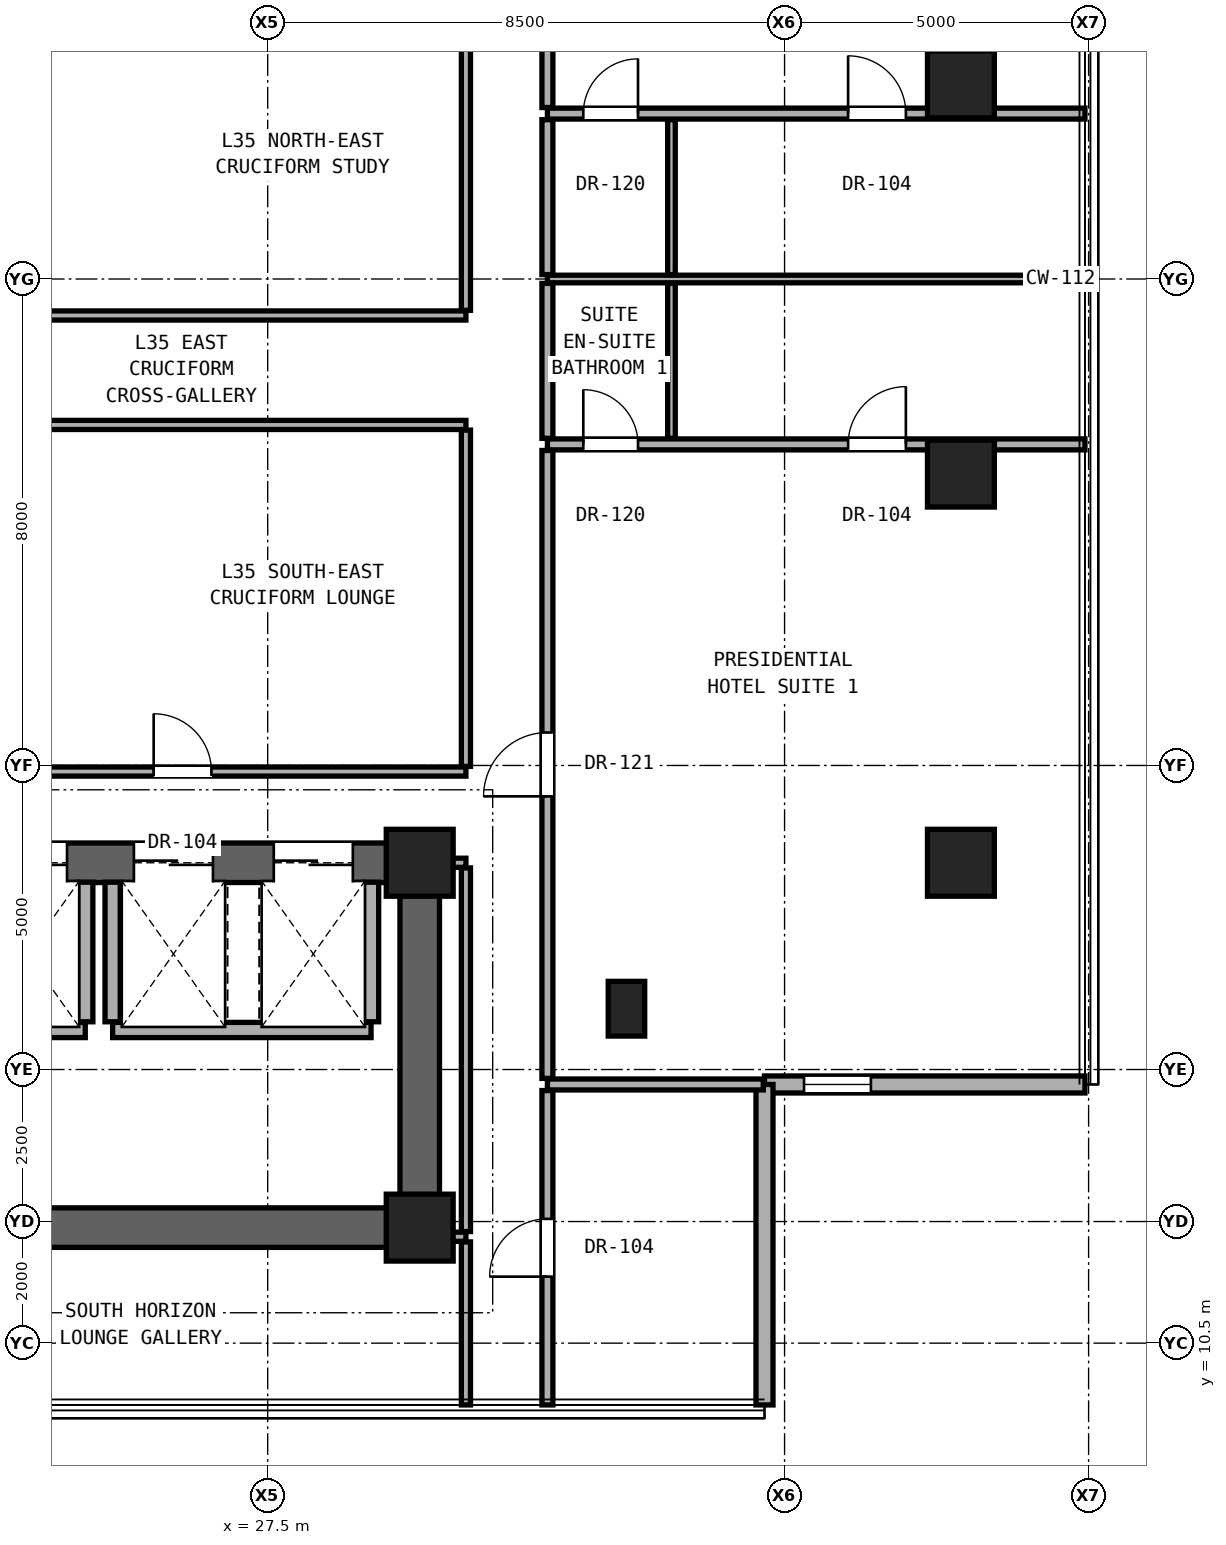
"""IFC4 building model, lengths in metres.
Left out: names, types, materials, properties, quantities, classifications, styles, units other than length and angle.
Written with IfcOpenShell. Run it as: python <this file> out.ifc"""

import sys

from ifc_helpers import new_model, si_unit, direction, frame, frame_2d, origin, origin_2d, place, context, subcontext, project, spatial, rectangle, hollow_rectangle, extrude, element, fill, save


model = new_model("IFC4")
c1 = context("Model", 3, precision=1e-05, world=origin(), true_north=direction((0.0, 1.0)))
c2 = subcontext(c1, "Body", "Model", "MODEL_VIEW")
j1 = project(units=[si_unit("LENGTHUNIT", "METRE"), si_unit("PLANEANGLEUNIT", "RADIAN")], contexts=[c1])
p1 = place(None, origin())
s1 = spatial("IfcSite", under=j1, at=p1, CompositionType="ELEMENT")
p2 = place(p1, origin())
s2 = spatial("IfcBuilding", under=s1, at=p2, CompositionType="ELEMENT")
p3 = place(p2, frame((0.0, 0.0, 124.7)))
s3 = spatial("IfcBuildingStorey", under=s2, at=p3, CompositionType="ELEMENT", Elevation=124.7)
for number, where, z_axis, x_axis in (
    (1, (30.0, 12.4, 0.0), (0.0, 0.0, 1.0), (1.0, 0.0, 0.0)),
    (2, (30.0, 18.4, 0.0), (0.0, 0.0, 1.0), (1.0, 0.0, 0.0)),
):
    element("IfcColumn", number, at=place(p3, frame(where, z_axis=z_axis, x_axis=x_axis)), inside=s3, PredefinedType="COLUMN", context=c2, shape_type="SweptSolid", body=[
        extrude(rectangle(XDim=1.1, YDim=1.1, at=origin_2d()), origin(), (0.0, 0.0, 1.0), 3.3),
    ])
for number, where, z_axis, x_axis in (
    (3, (38.9, 18.4, 0.0), (0.0, 0.0, 1.0), (1.0, 0.0, 0.0)),
    (4, (38.9, 24.8, 0.0), (0.0, 0.0, 1.0), (1.0, 0.0, 0.0)),
    (5, (38.9, 31.2, 0.0), (0.0, 0.0, 1.0), (1.0, 0.0, 0.0)),
):
    element("IfcColumn", number, at=place(p3, frame(where, z_axis=z_axis, x_axis=x_axis)), inside=s3, PredefinedType="COLUMN", context=c2, shape_type="SweptSolid", body=[
        extrude(hollow_rectangle(XDim=1.1, YDim=1.1, WallThickness=0.06, at=origin_2d()), origin(), (0.0, 0.0, 1.0), 3.3),
    ])
p4 = place(p3, frame((33.4, 16.0, 0.0), z_axis=(0.0, 0.0, 1.0), x_axis=(1.0, 0.0, 0.0)))
e6 = element("IfcColumn", 6, at=p4, inside=s3, PredefinedType="PILASTER", context=c2, shape_type="SweptSolid", body=[
    extrude(rectangle(XDim=0.6, YDim=0.9, at=origin_2d()), origin(), (0.0, 0.0, 1.0), 3.3),
])
p5 = place(p3, frame((11.0, 12.4, 0.0), z_axis=(0.0, 0.0, 1.0), x_axis=(1.0, 0.0, 0.0)))
e7 = element("IfcWall", 7, at=p5, inside=s3, PredefinedType="SHEAR", context=c2, shape_type="SweptSolid", body=[
    extrude(rectangle(XDim=19.0, YDim=0.65, at=frame_2d((9.5, 0.0))), origin(), (0.0, 0.0, 1.0), 3.08),
])
p6 = place(p3, frame((30.0, 12.4, 0.0), z_axis=(0.0, 0.0, 1.0), x_axis=(0.0, 1.0, 0.0)))
e8 = element("IfcWall", 8, at=p6, inside=s3, PredefinedType="SHEAR", context=c2, shape_type="SweptSolid", body=[
    extrude(rectangle(XDim=6.0, YDim=0.65, at=frame_2d((3.0, 0.0))), origin(), (0.0, 0.0, 1.0), 3.08),
])
p7 = place(p3, frame((11.0, 18.4, 0.0), z_axis=(0.0, 0.0, 1.0), x_axis=(1.0, 0.0, 0.0)))
e9 = element("IfcWall", 9, at=p7, inside=s3, PredefinedType="SHEAR", context=c2, shape_type="SweptSolid", body=[
    extrude(rectangle(XDim=19.0, YDim=0.65, at=frame_2d((9.5, 0.0))), origin(), (0.0, 0.0, 1.0), 3.08),
])
p8 = place(p7, frame((4.175, 0.0, 0.0)))
e10 = element("IfcOpeningElement", 10, at=p8, cuts=e9, PredefinedType="OPENING", context=c2, shape_type="SweptSolid", body=[
    extrude(rectangle(XDim=1.2, YDim=2.25, at=frame_2d((0.6, 1.125))), frame((0.0, 0.335, 0.0), z_axis=(0.0, -1.0, 0.0), x_axis=(1.0, 0.0, 0.0)), (0.0, 0.0, 1.0), 0.67),
])
p9 = place(p7, frame((9.6, 0.0, 0.0)))
e11 = element("IfcOpeningElement", 11, at=p9, cuts=e9, PredefinedType="OPENING", context=c2, shape_type="SweptSolid", body=[
    extrude(rectangle(XDim=1.3, YDim=2.3, at=frame_2d((0.65, 1.15))), frame((0.0, 0.335, 0.0), z_axis=(0.0, -1.0, 0.0), x_axis=(1.0, 0.0, 0.0)), (0.0, 0.0, 1.0), 0.67),
])
p10 = place(p7, frame((11.9, 0.0, 0.0)))
e12 = element("IfcOpeningElement", 12, at=p10, cuts=e9, PredefinedType="OPENING", context=c2, shape_type="SweptSolid", body=[
    extrude(rectangle(XDim=1.3, YDim=2.3, at=frame_2d((0.65, 1.15))), frame((0.0, 0.335, 0.0), z_axis=(0.0, -1.0, 0.0), x_axis=(1.0, 0.0, 0.0)), (0.0, 0.0, 1.0), 0.67),
])
p11 = place(p7, frame((14.3, 0.0, 0.0)))
e13 = element("IfcOpeningElement", 13, at=p11, cuts=e9, PredefinedType="OPENING", context=c2, shape_type="SweptSolid", body=[
    extrude(rectangle(XDim=1.3, YDim=2.3, at=frame_2d((0.65, 1.15))), frame((0.0, 0.335, 0.0), z_axis=(0.0, -1.0, 0.0), x_axis=(1.0, 0.0, 0.0)), (0.0, 0.0, 1.0), 0.67),
])
p12 = place(p7, frame((16.6, 0.0, 0.0)))
e14 = element("IfcOpeningElement", 14, at=p12, cuts=e9, PredefinedType="OPENING", context=c2, shape_type="SweptSolid", body=[
    extrude(rectangle(XDim=1.3, YDim=2.3, at=frame_2d((0.65, 1.15))), frame((0.0, 0.335, 0.0), z_axis=(0.0, -1.0, 0.0), x_axis=(1.0, 0.0, 0.0)), (0.0, 0.0, 1.0), 0.67),
])
p13 = place(p3, frame((35.67, 14.754, 0.0), z_axis=(0.0, 0.0, 1.0), x_axis=(1.0, 0.0, 0.0)))
e15 = element("IfcWall", 15, at=p13, inside=s3, PredefinedType="SOLIDWALL", context=c2, shape_type="SweptSolid", body=[
    extrude(rectangle(XDim=5.27, YDim=0.28, at=frame_2d((2.635, 0.0))), origin(), (0.0, 0.0, 1.0), 3.06),
])
p14 = place(p13, frame((0.65, 0.0, 0.85)))
e16 = element("IfcOpeningElement", 16, at=p14, cuts=e15, PredefinedType="OPENING", context=c2, shape_type="SweptSolid", body=[
    extrude(rectangle(XDim=1.1, YDim=2.0, at=frame_2d((0.55, 1.0))), frame((0.0, 0.15, 0.0), z_axis=(0.0, -1.0, 0.0), x_axis=(1.0, 0.0, 0.0)), (0.0, 0.0, 1.0), 0.3),
])
p15 = place(p3, frame((35.67, 9.484, 0.0), z_axis=(0.0, 0.0, 1.0), x_axis=(0.0, 1.0, 0.0)))
e17 = element("IfcWall", 17, at=p15, inside=s3, PredefinedType="SOLIDWALL", context=c2, shape_type="SweptSolid", body=[
    extrude(rectangle(XDim=5.27, YDim=0.28, at=frame_2d((2.635, 0.0))), origin(), (0.0, 0.0, 1.0), 3.06),
])
p16 = place(p3, frame((30.32, 12.25, 0.0), z_axis=(0.0, 0.0, 1.0), x_axis=(1.0, 0.0, 0.0)))
e18 = element("IfcWall", 18, at=p16, inside=s3, PredefinedType="PARTITIONING", context=c2, shape_type="SweptSolid", body=[
    extrude(rectangle(XDim=0.44, YDim=0.15, at=frame_2d((0.22, 0.0))), origin(), (0.0, 0.0, 1.0), 3.08),
])
p17 = place(p3, frame((32.1, 14.754, 0.0), z_axis=(0.0, 0.0, 1.0), x_axis=(1.0, 0.0, 0.0)))
e19 = element("IfcWall", 19, at=p17, inside=s3, PredefinedType="PARTITIONING", context=c2, shape_type="SweptSolid", body=[
    extrude(rectangle(XDim=3.55, YDim=0.18, at=frame_2d((1.775, 0.0))), origin(), (0.0, 0.0, 1.0), 3.08),
])
p18 = place(p3, frame((20.35, 15.65, 0.0), z_axis=(0.0, 0.0, 1.0), x_axis=(1.0, 0.0, 0.0)))
e20 = element("IfcWall", 20, at=p18, inside=s3, PredefinedType="SOLIDWALL", context=c2, shape_type="SweptSolid", body=[
    extrude(rectangle(XDim=4.15, YDim=0.25, at=frame_2d((2.075, 0.0))), origin(), (0.0, 0.0, 1.0), 3.08),
])
p19 = place(p3, frame((24.95, 15.65, 0.0), z_axis=(0.0, 0.0, 1.0), x_axis=(1.0, 0.0, 0.0)))
e21 = element("IfcWall", 21, at=p19, inside=s3, PredefinedType="SOLIDWALL", context=c2, shape_type="SweptSolid", body=[
    extrude(rectangle(XDim=4.25, YDim=0.25, at=frame_2d((2.125, 0.0))), origin(), (0.0, 0.0, 1.0), 3.08),
])
p20 = place(p3, frame((30.32, 18.4, 0.0), z_axis=(0.0, 0.0, 1.0), x_axis=(1.0, 0.0, 0.0)))
e22 = element("IfcWall", 22, at=p20, inside=s3, PredefinedType="PARTITIONING", context=c2, shape_type="SweptSolid", body=[
    extrude(rectangle(XDim=0.44, YDim=0.15, at=frame_2d((0.22, 0.0))), origin(), (0.0, 0.0, 1.0), 2.456),
])
p21 = place(p3, frame((21.44, 19.9, 0.0), z_axis=(0.0, 0.0, 1.0), x_axis=(1.0, 0.0, 0.0)))
e23 = element("IfcWall", 23, at=p21, inside=s3, PredefinedType="PARTITIONING", context=c2, shape_type="SweptSolid", body=[
    extrude(rectangle(XDim=9.32, YDim=0.15, at=frame_2d((4.66, 0.0))), origin(), (0.0, 0.0, 1.0), 2.216),
])
p22 = place(p21, frame((4.185, 0.0, 0.0)))
e24 = element("IfcOpeningElement", 24, at=p22, cuts=e23, PredefinedType="OPENING", context=c2, shape_type="SweptSolid", body=[
    extrude(rectangle(XDim=0.95, YDim=2.15, at=frame_2d((0.475, 1.075))), frame((0.0, 0.085, 0.0), z_axis=(0.0, -1.0, 0.0), x_axis=(1.0, 0.0, 0.0)), (0.0, 0.0, 1.0), 0.17),
])
p23 = place(p3, frame((32.1, 25.28, 0.0), z_axis=(0.0, 0.0, 1.0), x_axis=(1.0, 0.0, 0.0)))
e25 = element("IfcWall", 25, at=p23, inside=s3, PredefinedType="PARTITIONING", context=c2, shape_type="SweptSolid", body=[
    extrude(rectangle(XDim=8.84, YDim=0.18, at=frame_2d((4.42, 0.0))), origin(), (0.0, 0.0, 1.0), 2.299),
])
p24 = place(p23, frame((4.945, 0.0, 0.0)))
e26 = element("IfcOpeningElement", 26, at=p24, cuts=e25, PredefinedType="OPENING", context=c2, shape_type="SweptSolid", body=[
    extrude(rectangle(XDim=0.95, YDim=2.15, at=frame_2d((0.475, 1.075))), frame((0.0, 0.1, 0.0), z_axis=(0.0, -1.0, 0.0), x_axis=(1.0, 0.0, 0.0)), (0.0, 0.0, 1.0), 0.2),
])
p25 = place(p23, frame((0.59, 0.0, 0.0)))
e27 = element("IfcOpeningElement", 27, at=p25, cuts=e25, PredefinedType="OPENING", context=c2, shape_type="SweptSolid", body=[
    extrude(rectangle(XDim=0.9, YDim=2.1, at=frame_2d((0.45, 1.05))), frame((0.0, 0.1, 0.0), z_axis=(0.0, -1.0, 0.0), x_axis=(1.0, 0.0, 0.0)), (0.0, 0.0, 1.0), 0.2),
])
for number, where, z_axis, x_axis in (
    (28, (21.4, 25.6, 0.0), (0.0, 0.0, 1.0), (1.0, 0.0, 0.0)),
    (29, (21.4, 27.4, 0.0), (0.0, 0.0, 1.0), (1.0, 0.0, 0.0)),
):
    element("IfcWall", number, at=place(p3, frame(where, z_axis=z_axis, x_axis=x_axis)), inside=s3, PredefinedType="PARTITIONING", context=c2, shape_type="SweptSolid", body=[
        extrude(rectangle(XDim=9.36, YDim=0.15, at=frame_2d((4.68, 0.0))), origin(), (0.0, 0.0, 1.0), 2.216),
    ])
p26 = place(p3, frame((32.1, 28.0, 0.0), z_axis=(0.0, 0.0, 1.0), x_axis=(1.0, 0.0, 0.0)))
e30 = element("IfcWall", 30, at=p26, inside=s3, PredefinedType="PARTITIONING", context=c2, shape_type="SweptSolid", body=[
    extrude(rectangle(XDim=8.84, YDim=0.125, at=frame_2d((4.42, 0.0))), origin(), (0.0, 0.0, 1.0), 2.299),
])
p27 = place(p3, frame((32.1, 30.72, 0.0), z_axis=(0.0, 0.0, 1.0), x_axis=(1.0, 0.0, 0.0)))
e31 = element("IfcWall", 31, at=p27, inside=s3, PredefinedType="PARTITIONING", context=c2, shape_type="SweptSolid", body=[
    extrude(rectangle(XDim=8.84, YDim=0.18, at=frame_2d((4.42, 0.0))), origin(), (0.0, 0.0, 1.0), 2.299),
])
p28 = place(p27, frame((4.945, 0.0, 0.0)))
e32 = element("IfcOpeningElement", 32, at=p28, cuts=e31, PredefinedType="OPENING", context=c2, shape_type="SweptSolid", body=[
    extrude(rectangle(XDim=0.95, YDim=2.15, at=frame_2d((0.475, 1.075))), frame((0.0, 0.1, 0.0), z_axis=(0.0, -1.0, 0.0), x_axis=(1.0, 0.0, 0.0)), (0.0, 0.0, 1.0), 0.2),
])
p29 = place(p27, frame((0.59, 0.0, 0.0)))
e33 = element("IfcOpeningElement", 33, at=p29, cuts=e31, PredefinedType="OPENING", context=c2, shape_type="SweptSolid", body=[
    extrude(rectangle(XDim=0.9, YDim=2.1, at=frame_2d((0.45, 1.05))), frame((0.0, 0.1, 0.0), z_axis=(0.0, -1.0, 0.0), x_axis=(1.0, 0.0, 0.0)), (0.0, 0.0, 1.0), 0.2),
])
for number, where, z_axis, x_axis in (
    (34, (24.5, 15.785, 0.0), (0.0, 0.0, 1.0), (0.0, 1.0, 0.0)),
    (35, (24.95, 15.785, 0.0), (0.0, 0.0, 1.0), (0.0, 1.0, 0.0)),
    (36, (29.2, 15.785, 0.0), (0.0, 0.0, 1.0), (0.0, 1.0, 0.0)),
):
    element("IfcWall", number, at=place(p3, frame(where, z_axis=z_axis, x_axis=x_axis)), inside=s3, PredefinedType="SOLIDWALL", context=c2, shape_type="SweptSolid", body=[
        extrude(rectangle(XDim=2.295, YDim=0.25, at=frame_2d((1.147, 0.0))), origin(), (0.0, 0.0, 1.0), 3.08),
    ])
p30 = place(p3, frame((30.76, 9.484, 0.0), z_axis=(0.0, 0.0, 1.0), x_axis=(0.0, 1.0, 0.0)))
e37 = element("IfcWall", 37, at=p30, inside=s3, PredefinedType="PARTITIONING", context=c2, shape_type="SweptSolid", body=[
    extrude(rectangle(XDim=2.681, YDim=0.15, at=frame_2d((1.341, 0.0))), origin(), (0.0, 0.0, 1.0), 3.08),
])
p31 = place(p3, frame((30.76, 12.335, 0.0), z_axis=(0.0, 0.0, 1.0), x_axis=(0.0, 1.0, 0.0)))
e38 = element("IfcWall", 38, at=p31, inside=s3, PredefinedType="PARTITIONING", context=c2, shape_type="SweptSolid", body=[
    extrude(rectangle(XDim=5.98, YDim=0.15, at=frame_2d((2.99, 0.0))), origin(), (0.0, 0.0, 1.0), 2.456),
])
for number, where, z_axis, x_axis in (
    (39, (30.76, 19.985, 0.0), (0.0, 0.0, 1.0), (0.0, 1.0, 0.0)),
    (40, (30.76, 27.485, 0.0), (0.0, 0.0, 1.0), (0.0, 1.0, 0.0)),
):
    element("IfcWall", number, at=place(p3, frame(where, z_axis=z_axis, x_axis=x_axis)), inside=s3, PredefinedType="PARTITIONING", context=c2, shape_type="SweptSolid", body=[
        extrude(rectangle(XDim=5.53, YDim=0.15, at=frame_2d((2.765, 0.0))), origin(), (0.0, 0.0, 1.0), 2.299),
    ])
p32 = place(p3, frame((32.1, 9.484, 0.0), z_axis=(0.0, 0.0, 1.0), x_axis=(0.0, 1.0, 0.0)))
e41 = element("IfcWall", 41, at=p32, inside=s3, PredefinedType="PARTITIONING", context=c2, shape_type="SweptSolid", body=[
    extrude(rectangle(XDim=5.17, YDim=0.18, at=frame_2d((2.585, 0.0))), origin(), (0.0, 0.0, 1.0), 3.08),
])
p33 = place(p32, frame((2.11, 0.0, 0.0)))
e42 = element("IfcOpeningElement", 42, at=p33, cuts=e41, PredefinedType="OPENING", context=c2, shape_type="SweptSolid", body=[
    extrude(rectangle(XDim=0.95, YDim=2.15, at=frame_2d((0.475, 1.075))), frame((0.0, 0.1, 0.0), z_axis=(0.0, -1.0, 0.0), x_axis=(1.0, 0.0, 0.0)), (0.0, 0.0, 1.0), 0.2),
])
p34 = place(p3, frame((32.1, 14.854, 0.0), z_axis=(0.0, 0.0, 1.0), x_axis=(0.0, 1.0, 0.0)))
e43 = element("IfcWall", 43, at=p34, inside=s3, PredefinedType="PARTITIONING", context=c2, shape_type="SweptSolid", body=[
    extrude(rectangle(XDim=10.326, YDim=0.18, at=frame_2d((5.163, 0.0))), origin(), (0.0, 0.0, 1.0), 2.299),
])
p35 = place(p34, frame((4.638, 0.0, 0.0)))
e44 = element("IfcOpeningElement", 44, at=p35, cuts=e43, PredefinedType="OPENING", context=c2, shape_type="SweptSolid", body=[
    extrude(rectangle(XDim=1.05, YDim=2.2, at=frame_2d((0.525, 1.1))), frame((0.0, 0.1, 0.0), z_axis=(0.0, -1.0, 0.0), x_axis=(1.0, 0.0, 0.0)), (0.0, 0.0, 1.0), 0.2),
])
for number, where, z_axis, x_axis in (
    (45, (32.1, 25.38, 0.0), (0.0, 0.0, 1.0), (0.0, 1.0, 0.0)),
    (46, (32.1, 28.073, 0.0), (0.0, 0.0, 1.0), (0.0, 1.0, 0.0)),
):
    element("IfcWall", number, at=place(p3, frame(where, z_axis=z_axis, x_axis=x_axis)), inside=s3, PredefinedType="PARTITIONING", context=c2, shape_type="SweptSolid", body=[
        extrude(rectangle(XDim=2.548, YDim=0.18, at=frame_2d((1.274, 0.0))), origin(), (0.0, 0.0, 1.0), 3.08),
    ])
p36 = place(p3, frame((32.1, 30.82, 0.0), z_axis=(0.0, 0.0, 1.0), x_axis=(0.0, 1.0, 0.0)))
e47 = element("IfcWall", 47, at=p36, inside=s3, PredefinedType="PARTITIONING", context=c2, shape_type="SweptSolid", body=[
    extrude(rectangle(XDim=10.326, YDim=0.18, at=frame_2d((5.163, 0.0))), origin(), (0.0, 0.0, 1.0), 2.299),
])
p37 = place(p36, frame((4.638, 0.0, 0.0)))
e48 = element("IfcOpeningElement", 48, at=p37, cuts=e47, PredefinedType="OPENING", context=c2, shape_type="SweptSolid", body=[
    extrude(rectangle(XDim=1.05, YDim=2.2, at=frame_2d((0.525, 1.1))), frame((0.0, 0.1, 0.0), z_axis=(0.0, -1.0, 0.0), x_axis=(1.0, 0.0, 0.0)), (0.0, 0.0, 1.0), 0.2),
])
for number, where, z_axis, x_axis in (
    (49, (34.14, 25.38, 0.0), (0.0, 0.0, 1.0), (0.0, 1.0, 0.0)),
    (50, (34.14, 28.073, 0.0), (0.0, 0.0, 1.0), (0.0, 1.0, 0.0)),
):
    element("IfcWall", number, at=place(p3, frame(where, z_axis=z_axis, x_axis=x_axis)), inside=s3, PredefinedType="PARTITIONING", context=c2, shape_type="SweptSolid", body=[
        extrude(rectangle(XDim=2.548, YDim=0.125, at=frame_2d((1.274, 0.0))), origin(), (0.0, 0.0, 1.0), 3.08),
    ])
p38 = place(p14, origin())
e51 = element("IfcWindow", 51, at=p38, inside=s3, PartitioningType="SINGLE_PANEL", PredefinedType="WINDOW", context=c2, shape_type="SweptSolid", body=[
    extrude(rectangle(XDim=1.1, YDim=2.0, at=frame_2d((0.55, 1.0))), frame((0.0, 0.03, 0.0), z_axis=(0.0, -1.0, 0.0), x_axis=(1.0, 0.0, 0.0)), (0.0, 0.0, 1.0), 0.06),
])
fill(e16, e51)
p39 = place(p35, origin())
e52 = element("IfcDoor", 52, at=p39, inside=s3, OperationType="SINGLE_SWING_LEFT", PredefinedType="DOOR", context=c2, shape_type="SweptSolid", body=[
    extrude(rectangle(XDim=1.05, YDim=2.2, at=frame_2d((0.525, 1.1))), frame((0.0, 0.025, 0.0), z_axis=(0.0, -1.0, 0.0), x_axis=(1.0, 0.0, 0.0)), (0.0, 0.0, 1.0), 0.05),
])
fill(e44, e52)
p40 = place(p24, origin())
e53 = element("IfcDoor", 53, at=p40, inside=s3, OperationType="SINGLE_SWING_RIGHT", PredefinedType="DOOR", context=c2, shape_type="SweptSolid", body=[
    extrude(rectangle(XDim=0.95, YDim=2.15, at=frame_2d((0.475, 1.075))), frame((0.0, 0.025, 0.0), z_axis=(0.0, -1.0, 0.0), x_axis=(1.0, 0.0, 0.0)), (0.0, 0.0, 1.0), 0.05),
])
fill(e26, e53)
p41 = place(p25, origin())
e54 = element("IfcDoor", 54, at=p41, inside=s3, OperationType="SINGLE_SWING_LEFT", PredefinedType="DOOR", context=c2, shape_type="SweptSolid", body=[
    extrude(rectangle(XDim=0.9, YDim=2.1, at=frame_2d((0.45, 1.05))), frame((0.0, 0.025, 0.0), z_axis=(0.0, -1.0, 0.0), x_axis=(1.0, 0.0, 0.0)), (0.0, 0.0, 1.0), 0.05),
])
fill(e27, e54)
p42 = place(p28, origin())
e55 = element("IfcDoor", 55, at=p42, inside=s3, OperationType="SINGLE_SWING_LEFT", PredefinedType="DOOR", context=c2, shape_type="SweptSolid", body=[
    extrude(rectangle(XDim=0.95, YDim=2.15, at=frame_2d((0.475, 1.075))), frame((0.0, 0.025, 0.0), z_axis=(0.0, -1.0, 0.0), x_axis=(1.0, 0.0, 0.0)), (0.0, 0.0, 1.0), 0.05),
])
fill(e32, e55)
p43 = place(p29, origin())
e56 = element("IfcDoor", 56, at=p43, inside=s3, OperationType="SINGLE_SWING_RIGHT", PredefinedType="DOOR", context=c2, shape_type="SweptSolid", body=[
    extrude(rectangle(XDim=0.9, YDim=2.1, at=frame_2d((0.45, 1.05))), frame((0.0, 0.025, 0.0), z_axis=(0.0, -1.0, 0.0), x_axis=(1.0, 0.0, 0.0)), (0.0, 0.0, 1.0), 0.05),
])
fill(e33, e56)
p44 = place(p22, origin())
e57 = element("IfcDoor", 57, at=p44, inside=s3, OperationType="SINGLE_SWING_LEFT", PredefinedType="DOOR", context=c2, shape_type="SweptSolid", body=[
    extrude(rectangle(XDim=0.95, YDim=2.15, at=frame_2d((0.475, 1.075))), frame((0.0, 0.025, 0.0), z_axis=(0.0, -1.0, 0.0), x_axis=(1.0, 0.0, 0.0)), (0.0, 0.0, 1.0), 0.05),
])
fill(e24, e57)
p45 = place(p33, origin())
e58 = element("IfcDoor", 58, at=p45, inside=s3, OperationType="SINGLE_SWING_LEFT", PredefinedType="DOOR", context=c2, shape_type="SweptSolid", body=[
    extrude(rectangle(XDim=0.95, YDim=2.15, at=frame_2d((0.475, 1.075))), frame((0.0, 0.025, 0.0), z_axis=(0.0, -1.0, 0.0), x_axis=(1.0, 0.0, 0.0)), (0.0, 0.0, 1.0), 0.05),
])
fill(e42, e58)
p46 = place(p10, origin())
e59 = element("IfcDoor", 59, at=p46, inside=s3, OperationType="DOUBLE_DOOR_SLIDING", PredefinedType="DOOR", context=c2, shape_type="SweptSolid", body=[
    extrude(rectangle(XDim=1.3, YDim=2.3, at=frame_2d((0.65, 1.15))), frame((0.0, 0.025, 0.0), z_axis=(0.0, -1.0, 0.0), x_axis=(1.0, 0.0, 0.0)), (0.0, 0.0, 1.0), 0.05),
])
fill(e12, e59)
p47 = place(p11, origin())
e60 = element("IfcDoor", 60, at=p47, inside=s3, OperationType="DOUBLE_DOOR_SLIDING", PredefinedType="DOOR", context=c2, shape_type="SweptSolid", body=[
    extrude(rectangle(XDim=1.3, YDim=2.3, at=frame_2d((0.65, 1.15))), frame((0.0, 0.025, 0.0), z_axis=(0.0, -1.0, 0.0), x_axis=(1.0, 0.0, 0.0)), (0.0, 0.0, 1.0), 0.05),
])
fill(e13, e60)
p48 = place(p12, origin())
e61 = element("IfcDoor", 61, at=p48, inside=s3, OperationType="DOUBLE_DOOR_SLIDING", PredefinedType="DOOR", context=c2, shape_type="SweptSolid", body=[
    extrude(rectangle(XDim=1.3, YDim=2.3, at=frame_2d((0.65, 1.15))), frame((0.0, 0.025, 0.0), z_axis=(0.0, -1.0, 0.0), x_axis=(1.0, 0.0, 0.0)), (0.0, 0.0, 1.0), 0.05),
])
fill(e14, e61)
save(model, sys.argv[1])
